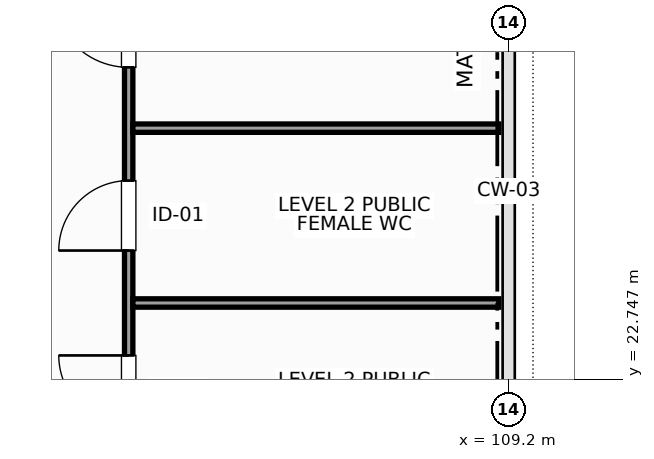
"""IFC4 building model, lengths in metres.
Left out: names, types, materials, properties, quantities, classifications, styles, units other than length and angle.
Written with IfcOpenShell. Run it as: python <this file> out.ifc"""

import sys

from ifc_helpers import new_model, si_unit, direction, frame, frame_2d, origin, place, context, subcontext, project, spatial, rectangle, extrude, element, fill, save


model = new_model("IFC4")
c1 = context("Model", 3, precision=1e-05, world=origin(), true_north=direction((0.0, 1.0)))
c2 = subcontext(c1, "Body", "Model", "MODEL_VIEW")
j1 = project(units=[si_unit("LENGTHUNIT", "METRE"), si_unit("PLANEANGLEUNIT", "RADIAN")], contexts=[c1])
p1 = place(None, origin())
s1 = spatial("IfcSite", under=j1, at=p1, CompositionType="ELEMENT")
p2 = place(p1, origin())
s2 = spatial("IfcBuilding", under=s1, at=p2, CompositionType="ELEMENT")
p3 = place(p2, frame((0.0, 0.0, 10.8)))
s3 = spatial("IfcBuildingStorey", under=s2, at=p3, CompositionType="ELEMENT", Elevation=10.8)
p4 = place(p3, frame((104.2, 21.395, 0.0), z_axis=(0.0, 0.0, 1.0), x_axis=(0.0, 1.0, 0.0)))
e1 = element("IfcWall", 1, at=p4, inside=s3, PredefinedType="PARTITIONING", context=c2, shape_type="SweptSolid", body=[
    extrude(rectangle(XDim=7.31, YDim=0.11, at=frame_2d((3.655, 0.0))), origin(), (0.0, 0.0, 1.0), 2.31),
])
p5 = place(p4, frame((0.745, 0.0, 0.0)))
e2 = element("IfcOpeningElement", 2, at=p5, cuts=e1, PredefinedType="OPENING", context=c2, shape_type="SweptSolid", body=[
    extrude(rectangle(XDim=0.92, YDim=2.1, at=frame_2d((0.46, 1.05))), frame((0.0, 0.065, 0.0), z_axis=(0.0, -1.0, 0.0), x_axis=(1.0, 0.0, 0.0)), (0.0, 0.0, 1.0), 0.13),
])
p6 = place(p4, frame((3.045, 0.0, 0.0)))
e3 = element("IfcOpeningElement", 3, at=p6, cuts=e1, PredefinedType="OPENING", context=c2, shape_type="SweptSolid", body=[
    extrude(rectangle(XDim=0.92, YDim=2.1, at=frame_2d((0.46, 1.05))), frame((0.0, 0.065, 0.0), z_axis=(0.0, -1.0, 0.0), x_axis=(1.0, 0.0, 0.0)), (0.0, 0.0, 1.0), 0.13),
])
p7 = place(p4, frame((5.455, 0.0, 0.0)))
e4 = element("IfcOpeningElement", 4, at=p7, cuts=e1, PredefinedType="OPENING", context=c2, shape_type="SweptSolid", body=[
    extrude(rectangle(XDim=1.0, YDim=2.15, at=frame_2d((0.5, 1.075))), frame((0.0, 0.065, 0.0), z_axis=(0.0, -1.0, 0.0), x_axis=(1.0, 0.0, 0.0)), (0.0, 0.0, 1.0), 0.13),
])
for number, where, z_axis, x_axis in (
    (5, (104.255, 23.75, 0.0), (0.0, 0.0, 1.0), (1.0, 0.0, 0.0)),
    (6, (104.255, 26.05, 0.0), (0.0, 0.0, 1.0), (1.0, 0.0, 0.0)),
):
    element("IfcWall", number, at=place(p3, frame(where, z_axis=z_axis, x_axis=x_axis)), inside=s3, PredefinedType="PARTITIONING", context=c2, shape_type="SweptSolid", body=[
        extrude(rectangle(XDim=4.815, YDim=0.11, at=frame_2d((2.408, 0.0))), origin(), (0.0, 0.0, 1.0), 2.31),
    ])
p8 = place(p5, origin())
e7 = element("IfcDoor", 7, at=p8, inside=s3, OperationType="SINGLE_SWING_RIGHT", PredefinedType="DOOR", context=c2, shape_type="SweptSolid", body=[
    extrude(rectangle(XDim=0.92, YDim=2.1, at=frame_2d((0.46, 1.05))), frame((0.0, 0.025, 0.0), z_axis=(0.0, -1.0, 0.0), x_axis=(1.0, 0.0, 0.0)), (0.0, 0.0, 1.0), 0.05),
])
fill(e2, e7)
p9 = place(p6, origin())
e8 = element("IfcDoor", 8, at=p9, inside=s3, OperationType="SINGLE_SWING_LEFT", PredefinedType="DOOR", context=c2, shape_type="SweptSolid", body=[
    extrude(rectangle(XDim=0.92, YDim=2.1, at=frame_2d((0.46, 1.05))), frame((0.0, 0.025, 0.0), z_axis=(0.0, -1.0, 0.0), x_axis=(1.0, 0.0, 0.0)), (0.0, 0.0, 1.0), 0.05),
])
fill(e3, e8)
p10 = place(p7, origin())
e9 = element("IfcDoor", 9, at=p10, inside=s3, OperationType="SINGLE_SWING_RIGHT", PredefinedType="DOOR", context=c2, shape_type="SweptSolid", body=[
    extrude(rectangle(XDim=1.0, YDim=2.15, at=frame_2d((0.5, 1.075))), frame((0.0, 0.025, 0.0), z_axis=(0.0, -1.0, 0.0), x_axis=(1.0, 0.0, 0.0)), (0.0, 0.0, 1.0), 0.05),
])
fill(e4, e9)
save(model, sys.argv[1])
